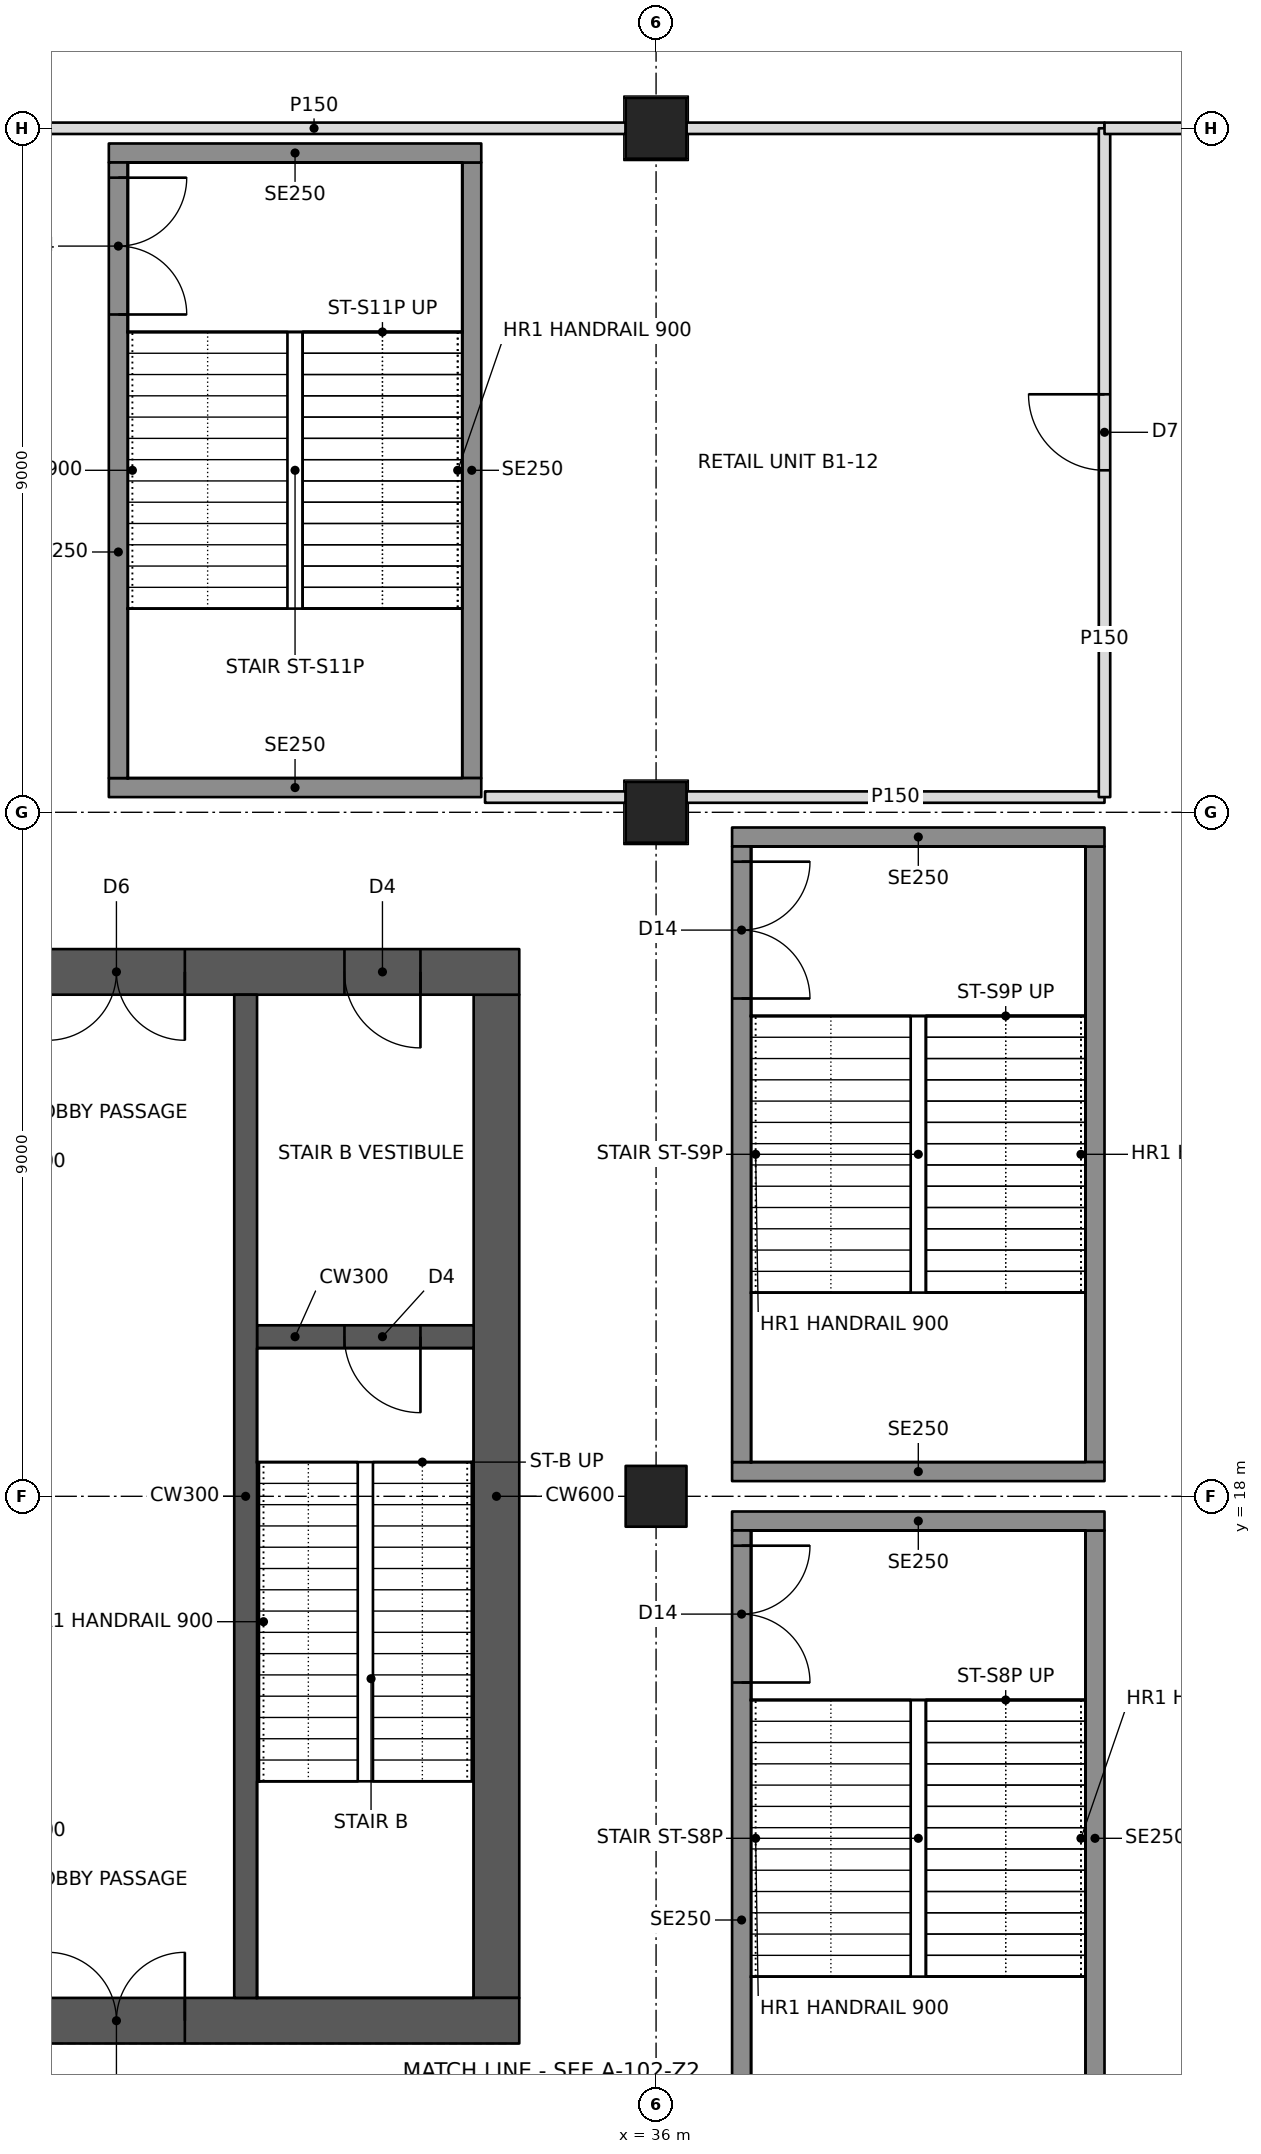
"""IFC4 building model, lengths in metres.
Left out: names, types, materials, properties, quantities, classifications, styles, units other than length and angle.
Written with IfcOpenShell. Run it as: python <this file> out.ifc"""

import sys

from ifc_helpers import new_model, si_unit, direction, frame, frame_2d, origin, origin_2d, place, context, subcontext, project, spatial, rectangle, hollow_rectangle, extrude, element, fill, save


model = new_model("IFC4")
c1 = context("Model", 3, precision=1e-05, world=origin(), true_north=direction((0.0, 1.0)))
c2 = subcontext(c1, "Body", "Model", "MODEL_VIEW")
j1 = project(units=[si_unit("LENGTHUNIT", "METRE"), si_unit("PLANEANGLEUNIT", "RADIAN")], contexts=[c1])
p1 = place(None, origin())
s1 = spatial("IfcSite", under=j1, at=p1, CompositionType="ELEMENT")
p2 = place(p1, origin())
s2 = spatial("IfcBuilding", under=s1, at=p2, CompositionType="ELEMENT")
p3 = place(p2, frame((0.0, 0.0, -5.5)))
s3 = spatial("IfcBuildingStorey", under=s2, at=p3, CompositionType="ELEMENT", Elevation=-5.5)
for number, where, z_axis, x_axis in (
    (1, (36.0, 18.0, 0.0), (0.0, 0.0, 1.0), (0.0, 1.0, 0.0)),
    (2, (36.0, 27.0, 0.0), (0.0, 0.0, 1.0), (1.0, 0.0, 0.0)),
    (3, (36.0, 36.0, 0.0), (0.0, 0.0, 1.0), (1.0, 0.0, 0.0)),
):
    element("IfcColumn", number, at=place(p3, frame(where, z_axis=z_axis, x_axis=x_axis)), inside=s3, PredefinedType="COLUMN", context=c2, shape_type="SweptSolid", body=[
        extrude(hollow_rectangle(XDim=0.8, YDim=0.8, WallThickness=0.1, at=origin_2d()), origin(), (0.0, 0.0, 1.0), 5.5),
    ])
p4 = place(p3, frame((10.8, 11.1, 0.0), z_axis=(0.0, 0.0, 1.0), x_axis=(1.0, 0.0, 0.0)))
e4 = element("IfcWall", 4, at=p4, inside=s3, PredefinedType="SHEAR", context=c2, shape_type="SweptSolid", body=[
    extrude(rectangle(XDim=23.4, YDim=0.6, at=frame_2d((11.7, 0.0))), origin(), (0.0, 0.0, 1.0), 5.5),
])
p5 = place(p4, frame((1.0, 0.0, 0.0)))
e5 = element("IfcOpeningElement", 5, at=p5, cuts=e4, PredefinedType="OPENING", context=c2, shape_type="SweptSolid", body=[
    extrude(rectangle(XDim=1.0, YDim=2.1, at=frame_2d((0.5, 1.05))), frame((0.0, 0.31, 0.0), z_axis=(0.0, -1.0, 0.0), x_axis=(1.0, 0.0, 0.0)), (0.0, 0.0, 1.0), 0.62),
])
p6 = place(p4, frame((17.2, 0.0, 0.0)))
e6 = element("IfcOpeningElement", 6, at=p6, cuts=e4, PredefinedType="OPENING", context=c2, shape_type="SweptSolid", body=[
    extrude(rectangle(XDim=1.8, YDim=2.1, at=frame_2d((0.9, 1.05))), frame((0.0, 0.31, 0.0), z_axis=(0.0, -1.0, 0.0), x_axis=(1.0, 0.0, 0.0)), (0.0, 0.0, 1.0), 0.62),
])
p7 = place(p3, frame((10.8, 24.9, 0.0), z_axis=(0.0, 0.0, 1.0), x_axis=(1.0, 0.0, 0.0)))
e7 = element("IfcWall", 7, at=p7, inside=s3, PredefinedType="SHEAR", context=c2, shape_type="SweptSolid", body=[
    extrude(rectangle(XDim=23.4, YDim=0.6, at=frame_2d((11.7, 0.0))), origin(), (0.0, 0.0, 1.0), 5.5),
])
p8 = place(p7, frame((17.2, 0.0, 0.0)))
e8 = element("IfcOpeningElement", 8, at=p8, cuts=e7, PredefinedType="OPENING", context=c2, shape_type="SweptSolid", body=[
    extrude(rectangle(XDim=1.8, YDim=2.1, at=frame_2d((0.9, 1.05))), frame((0.0, 0.31, 0.0), z_axis=(0.0, -1.0, 0.0), x_axis=(1.0, 0.0, 0.0)), (0.0, 0.0, 1.0), 0.62),
])
p9 = place(p7, frame((21.1, 0.0, 0.0)))
e9 = element("IfcOpeningElement", 9, at=p9, cuts=e7, PredefinedType="OPENING", context=c2, shape_type="SweptSolid", body=[
    extrude(rectangle(XDim=1.0, YDim=2.1, at=frame_2d((0.5, 1.05))), frame((0.0, 0.31, 0.0), z_axis=(0.0, -1.0, 0.0), x_axis=(1.0, 0.0, 0.0)), (0.0, 0.0, 1.0), 0.62),
])
p10 = place(p3, frame((33.9, 11.4, 0.0), z_axis=(0.0, 0.0, 1.0), x_axis=(0.0, 1.0, 0.0)))
e10 = element("IfcWall", 10, at=p10, inside=s3, PredefinedType="SHEAR", context=c2, shape_type="SweptSolid", body=[
    extrude(rectangle(XDim=13.2, YDim=0.6, at=frame_2d((6.6, 0.0))), origin(), (0.0, 0.0, 1.0), 5.5),
])
p11 = place(p3, frame((30.6, 11.4, 0.0), z_axis=(0.0, 0.0, 1.0), x_axis=(0.0, 1.0, 0.0)))
e11 = element("IfcWall", 11, at=p11, inside=s3, PredefinedType="SHEAR", context=c2, shape_type="SweptSolid", body=[
    extrude(rectangle(XDim=13.2, YDim=0.3, at=frame_2d((6.6, 0.0))), origin(), (0.0, 0.0, 1.0), 5.5),
])
p12 = place(p3, frame((30.75, 20.1, 0.0), z_axis=(0.0, 0.0, 1.0), x_axis=(1.0, 0.0, 0.0)))
e12 = element("IfcWall", 12, at=p12, inside=s3, PredefinedType="SHEAR", context=c2, shape_type="SweptSolid", body=[
    extrude(rectangle(XDim=2.85, YDim=0.3, at=frame_2d((1.425, 0.0))), origin(), (0.0, 0.0, 1.0), 5.5),
])
p13 = place(p12, frame((1.15, 0.0, 0.0)))
e13 = element("IfcOpeningElement", 13, at=p13, cuts=e12, PredefinedType="OPENING", context=c2, shape_type="SweptSolid", body=[
    extrude(rectangle(XDim=1.0, YDim=2.1, at=frame_2d((0.5, 1.05))), frame((0.0, 0.16, 0.0), z_axis=(0.0, -1.0, 0.0), x_axis=(1.0, 0.0, 0.0)), (0.0, 0.0, 1.0), 0.32),
])
p14 = place(p3, frame((41.9, 36.0, 0.0), z_axis=(0.0, 0.0, 1.0), x_axis=(-1.0, 0.0, 0.0)))
e14 = element("IfcWall", 14, at=p14, inside=s3, PredefinedType="PARTITIONING", context=c2, shape_type="SweptSolid", body=[
    extrude(rectangle(XDim=5.5, YDim=0.15, at=frame_2d((2.75, 0.0))), origin(), (0.0, 0.0, 1.0), 4.253),
])
p15 = place(p3, frame((35.6, 36.0, 0.0), z_axis=(0.0, 0.0, 1.0), x_axis=(-1.0, 0.0, 0.0)))
e15 = element("IfcWall", 15, at=p15, inside=s3, PredefinedType="PARTITIONING", context=c2, shape_type="SweptSolid", body=[
    extrude(rectangle(XDim=8.2, YDim=0.15, at=frame_2d((4.1, 0.0))), origin(), (0.0, 0.0, 1.0), 4.253),
])
p16 = place(p3, frame((41.9, 27.2, 0.0), z_axis=(0.0, 0.0, 1.0), x_axis=(-1.0, 0.0, 0.0)))
e16 = element("IfcWall", 16, at=p16, inside=s3, PredefinedType="PARTITIONING", context=c2, shape_type="SweptSolid", body=[
    extrude(rectangle(XDim=5.5, YDim=0.15, at=frame_2d((2.75, 0.0))), origin(), (0.0, 0.0, 1.0), 4.253),
])
p17 = place(p3, frame((35.6, 27.2, 0.0), z_axis=(0.0, 0.0, 1.0), x_axis=(-1.0, 0.0, 0.0)))
e17 = element("IfcWall", 17, at=p17, inside=s3, PredefinedType="PARTITIONING", context=c2, shape_type="SweptSolid", body=[
    extrude(rectangle(XDim=1.85, YDim=0.15, at=frame_2d((0.925, 0.0))), origin(), (0.0, 0.0, 1.0), 4.253),
])
p18 = place(p3, frame((41.9, 36.0, 0.0), z_axis=(0.0, 0.0, 1.0), x_axis=(0.0, -1.0, 0.0)))
e18 = element("IfcWall", 18, at=p18, inside=s3, PredefinedType="PARTITIONING", context=c2, shape_type="SweptSolid", body=[
    extrude(rectangle(XDim=8.8, YDim=0.15, at=frame_2d((4.4, 0.0))), origin(), (0.0, 0.0, 1.0), 4.252),
])
p19 = place(p18, frame((3.5, 0.0, 0.0)))
e19 = element("IfcOpeningElement", 19, at=p19, cuts=e18, PredefinedType="OPENING", context=c2, shape_type="SweptSolid", body=[
    extrude(rectangle(XDim=1.0, YDim=2.1, at=frame_2d((0.5, 1.05))), frame((0.0, 0.085, 0.0), z_axis=(0.0, -1.0, 0.0), x_axis=(1.0, 0.0, 0.0)), (0.0, 0.0, 1.0), 0.17),
])
p20 = place(p3, frame((44.6, 36.0, 0.0), z_axis=(0.0, 0.0, 1.0), x_axis=(-1.0, 0.0, 0.0)))
e20 = element("IfcWall", 20, at=p20, inside=s3, PredefinedType="PARTITIONING", context=c2, shape_type="SweptSolid", body=[
    extrude(rectangle(XDim=2.7, YDim=0.15, at=frame_2d((1.35, 0.0))), origin(), (0.0, 0.0, 1.0), 4.253),
])
p21 = place(p20, frame((0.6, 0.0, 0.0)))
e21 = element("IfcOpeningElement", 21, at=p21, cuts=e20, PredefinedType="OPENING", context=c2, shape_type="SweptSolid", body=[
    extrude(rectangle(XDim=1.0, YDim=2.1, at=frame_2d((0.5, 1.05))), frame((0.0, 0.085, 0.0), z_axis=(0.0, -1.0, 0.0), x_axis=(1.0, 0.0, 0.0)), (0.0, 0.0, 1.0), 0.17),
])
p22 = place(p3, frame((37.0, 17.675, 0.0), z_axis=(0.0, 0.0, 1.0), x_axis=(1.0, 0.0, 0.0)))
e22 = element("IfcWall", 22, at=p22, inside=s3, PredefinedType="SOLIDWALL", context=c2, shape_type="SweptSolid", body=[
    extrude(rectangle(XDim=4.9, YDim=0.25, at=frame_2d((2.45, 0.0))), origin(), (0.0, 0.0, 1.0), 5.2),
])
p23 = place(p3, frame((37.125, 9.45, 0.0), z_axis=(0.0, 0.0, 1.0), x_axis=(0.0, 1.0, 0.0)))
e23 = element("IfcWall", 23, at=p23, inside=s3, PredefinedType="SOLIDWALL", context=c2, shape_type="SweptSolid", body=[
    extrude(rectangle(XDim=8.1, YDim=0.25, at=frame_2d((4.05, 0.0))), origin(), (0.0, 0.0, 1.0), 5.2),
])
p24 = place(p23, frame((6.1, 0.0, 0.0)))
e24 = element("IfcOpeningElement", 24, at=p24, cuts=e23, PredefinedType="OPENING", context=c2, shape_type="SweptSolid", body=[
    extrude(rectangle(XDim=1.8, YDim=2.1, at=frame_2d((0.9, 1.05))), frame((0.0, 0.135, 0.0), z_axis=(0.0, -1.0, 0.0), x_axis=(1.0, 0.0, 0.0)), (0.0, 0.0, 1.0), 0.27),
])
p25 = place(p3, frame((41.775, 9.45, 0.0), z_axis=(0.0, 0.0, 1.0), x_axis=(0.0, 1.0, 0.0)))
e25 = element("IfcWall", 25, at=p25, inside=s3, PredefinedType="SOLIDWALL", context=c2, shape_type="SweptSolid", body=[
    extrude(rectangle(XDim=8.1, YDim=0.25, at=frame_2d((4.05, 0.0))), origin(), (0.0, 0.0, 1.0), 5.2),
])
for number, where, z_axis, x_axis in (
    (26, (37.0, 18.325, 0.0), (0.0, 0.0, 1.0), (1.0, 0.0, 0.0)),
    (27, (37.0, 26.675, 0.0), (0.0, 0.0, 1.0), (1.0, 0.0, 0.0)),
):
    element("IfcWall", number, at=place(p3, frame(where, z_axis=z_axis, x_axis=x_axis)), inside=s3, PredefinedType="SOLIDWALL", context=c2, shape_type="SweptSolid", body=[
        extrude(rectangle(XDim=4.9, YDim=0.25, at=frame_2d((2.45, 0.0))), origin(), (0.0, 0.0, 1.0), 5.2),
    ])
p26 = place(p3, frame((37.125, 18.45, 0.0), z_axis=(0.0, 0.0, 1.0), x_axis=(0.0, 1.0, 0.0)))
e28 = element("IfcWall", 28, at=p26, inside=s3, PredefinedType="SOLIDWALL", context=c2, shape_type="SweptSolid", body=[
    extrude(rectangle(XDim=8.1, YDim=0.25, at=frame_2d((4.05, 0.0))), origin(), (0.0, 0.0, 1.0), 5.2),
])
p27 = place(p26, frame((6.1, 0.0, 0.0)))
e29 = element("IfcOpeningElement", 29, at=p27, cuts=e28, PredefinedType="OPENING", context=c2, shape_type="SweptSolid", body=[
    extrude(rectangle(XDim=1.8, YDim=2.1, at=frame_2d((0.9, 1.05))), frame((0.0, 0.135, 0.0), z_axis=(0.0, -1.0, 0.0), x_axis=(1.0, 0.0, 0.0)), (0.0, 0.0, 1.0), 0.27),
])
p28 = place(p3, frame((41.775, 18.45, 0.0), z_axis=(0.0, 0.0, 1.0), x_axis=(0.0, 1.0, 0.0)))
e30 = element("IfcWall", 30, at=p28, inside=s3, PredefinedType="SOLIDWALL", context=c2, shape_type="SweptSolid", body=[
    extrude(rectangle(XDim=8.1, YDim=0.25, at=frame_2d((4.05, 0.0))), origin(), (0.0, 0.0, 1.0), 5.2),
])
for number, where, z_axis, x_axis in (
    (31, (28.8, 27.325, 0.0), (0.0, 0.0, 1.0), (1.0, 0.0, 0.0)),
    (32, (28.8, 35.675, 0.0), (0.0, 0.0, 1.0), (1.0, 0.0, 0.0)),
):
    element("IfcWall", number, at=place(p3, frame(where, z_axis=z_axis, x_axis=x_axis)), inside=s3, PredefinedType="SOLIDWALL", context=c2, shape_type="SweptSolid", body=[
        extrude(rectangle(XDim=4.9, YDim=0.25, at=frame_2d((2.45, 0.0))), origin(), (0.0, 0.0, 1.0), 5.2),
    ])
p29 = place(p3, frame((28.925, 27.45, 0.0), z_axis=(0.0, 0.0, 1.0), x_axis=(0.0, 1.0, 0.0)))
e33 = element("IfcWall", 33, at=p29, inside=s3, PredefinedType="SOLIDWALL", context=c2, shape_type="SweptSolid", body=[
    extrude(rectangle(XDim=8.1, YDim=0.25, at=frame_2d((4.05, 0.0))), origin(), (0.0, 0.0, 1.0), 5.2),
])
p30 = place(p29, frame((6.1, 0.0, 0.0)))
e34 = element("IfcOpeningElement", 34, at=p30, cuts=e33, PredefinedType="OPENING", context=c2, shape_type="SweptSolid", body=[
    extrude(rectangle(XDim=1.8, YDim=2.1, at=frame_2d((0.9, 1.05))), frame((0.0, 0.135, 0.0), z_axis=(0.0, -1.0, 0.0), x_axis=(1.0, 0.0, 0.0)), (0.0, 0.0, 1.0), 0.27),
])
p31 = place(p3, frame((33.575, 27.45, 0.0), z_axis=(0.0, 0.0, 1.0), x_axis=(0.0, 1.0, 0.0)))
e35 = element("IfcWall", 35, at=p31, inside=s3, PredefinedType="SOLIDWALL", context=c2, shape_type="SweptSolid", body=[
    extrude(rectangle(XDim=8.1, YDim=0.25, at=frame_2d((4.05, 0.0))), origin(), (0.0, 0.0, 1.0), 5.2),
])
p32 = place(p19, frame((1.0, 0.0, 0.0), z_axis=(0.0, 0.0, 1.0), x_axis=(-1.0, 0.0, 0.0)))
e36 = element("IfcDoor", 36, at=p32, inside=s3, OperationType="SINGLE_SWING_RIGHT", PredefinedType="DOOR", context=c2, shape_type="SweptSolid", body=[
    extrude(rectangle(XDim=1.0, YDim=2.1, at=frame_2d((0.5, 1.05))), frame((0.0, 0.025, 0.0), z_axis=(0.0, -1.0, 0.0), x_axis=(1.0, 0.0, 0.0)), (0.0, 0.0, 1.0), 0.05),
])
fill(e19, e36)
p33 = place(p6, origin())
e37 = element("IfcDoor", 37, at=p33, inside=s3, OperationType="DOUBLE_DOOR_SINGLE_SWING", PredefinedType="DOOR", context=c2, shape_type="SweptSolid", body=[
    extrude(rectangle(XDim=1.8, YDim=2.1, at=frame_2d((0.9, 1.05))), frame((0.0, 0.025, 0.0), z_axis=(0.0, -1.0, 0.0), x_axis=(1.0, 0.0, 0.0)), (0.0, 0.0, 1.0), 0.05),
])
fill(e6, e37)
p34 = place(p8, frame((1.8, 0.0, 0.0), z_axis=(0.0, 0.0, 1.0), x_axis=(-1.0, 0.0, 0.0)))
e38 = element("IfcDoor", 38, at=p34, inside=s3, OperationType="DOUBLE_DOOR_SINGLE_SWING", PredefinedType="DOOR", context=c2, shape_type="SweptSolid", body=[
    extrude(rectangle(XDim=1.8, YDim=2.1, at=frame_2d((0.9, 1.05))), frame((0.0, 0.025, 0.0), z_axis=(0.0, -1.0, 0.0), x_axis=(1.0, 0.0, 0.0)), (0.0, 0.0, 1.0), 0.05),
])
fill(e8, e38)
p35 = place(p9, frame((1.0, 0.0, 0.0), z_axis=(0.0, 0.0, 1.0), x_axis=(-1.0, 0.0, 0.0)))
e39 = element("IfcDoor", 39, at=p35, inside=s3, OperationType="SINGLE_SWING_LEFT", PredefinedType="DOOR", context=c2, shape_type="SweptSolid", body=[
    extrude(rectangle(XDim=1.0, YDim=2.1, at=frame_2d((0.5, 1.05))), frame((0.0, 0.025, 0.0), z_axis=(0.0, -1.0, 0.0), x_axis=(1.0, 0.0, 0.0)), (0.0, 0.0, 1.0), 0.05),
])
fill(e9, e39)
p36 = place(p13, frame((1.0, 0.0, 0.0), z_axis=(0.0, 0.0, 1.0), x_axis=(-1.0, 0.0, 0.0)))
e40 = element("IfcDoor", 40, at=p36, inside=s3, OperationType="SINGLE_SWING_LEFT", PredefinedType="DOOR", context=c2, shape_type="SweptSolid", body=[
    extrude(rectangle(XDim=1.0, YDim=2.1, at=frame_2d((0.5, 1.05))), frame((0.0, 0.025, 0.0), z_axis=(0.0, -1.0, 0.0), x_axis=(1.0, 0.0, 0.0)), (0.0, 0.0, 1.0), 0.05),
])
fill(e13, e40)
p37 = place(p24, frame((1.8, 0.0, 0.0), z_axis=(0.0, 0.0, 1.0), x_axis=(-1.0, 0.0, 0.0)))
e41 = element("IfcDoor", 41, at=p37, inside=s3, OperationType="DOUBLE_DOOR_SINGLE_SWING", PredefinedType="DOOR", context=c2, shape_type="SweptSolid", body=[
    extrude(rectangle(XDim=1.8, YDim=2.1, at=frame_2d((0.9, 1.05))), frame((0.0, 0.025, 0.0), z_axis=(0.0, -1.0, 0.0), x_axis=(1.0, 0.0, 0.0)), (0.0, 0.0, 1.0), 0.05),
])
fill(e24, e41)
p38 = place(p27, frame((1.8, 0.0, 0.0), z_axis=(0.0, 0.0, 1.0), x_axis=(-1.0, 0.0, 0.0)))
e42 = element("IfcDoor", 42, at=p38, inside=s3, OperationType="DOUBLE_DOOR_SINGLE_SWING", PredefinedType="DOOR", context=c2, shape_type="SweptSolid", body=[
    extrude(rectangle(XDim=1.8, YDim=2.1, at=frame_2d((0.9, 1.05))), frame((0.0, 0.025, 0.0), z_axis=(0.0, -1.0, 0.0), x_axis=(1.0, 0.0, 0.0)), (0.0, 0.0, 1.0), 0.05),
])
fill(e29, e42)
p39 = place(p30, frame((1.8, 0.0, 0.0), z_axis=(0.0, 0.0, 1.0), x_axis=(-1.0, 0.0, 0.0)))
e43 = element("IfcDoor", 43, at=p39, inside=s3, OperationType="DOUBLE_DOOR_SINGLE_SWING", PredefinedType="DOOR", context=c2, shape_type="SweptSolid", body=[
    extrude(rectangle(XDim=1.8, YDim=2.1, at=frame_2d((0.9, 1.05))), frame((0.0, 0.025, 0.0), z_axis=(0.0, -1.0, 0.0), x_axis=(1.0, 0.0, 0.0)), (0.0, 0.0, 1.0), 0.05),
])
fill(e34, e43)
save(model, sys.argv[1])
